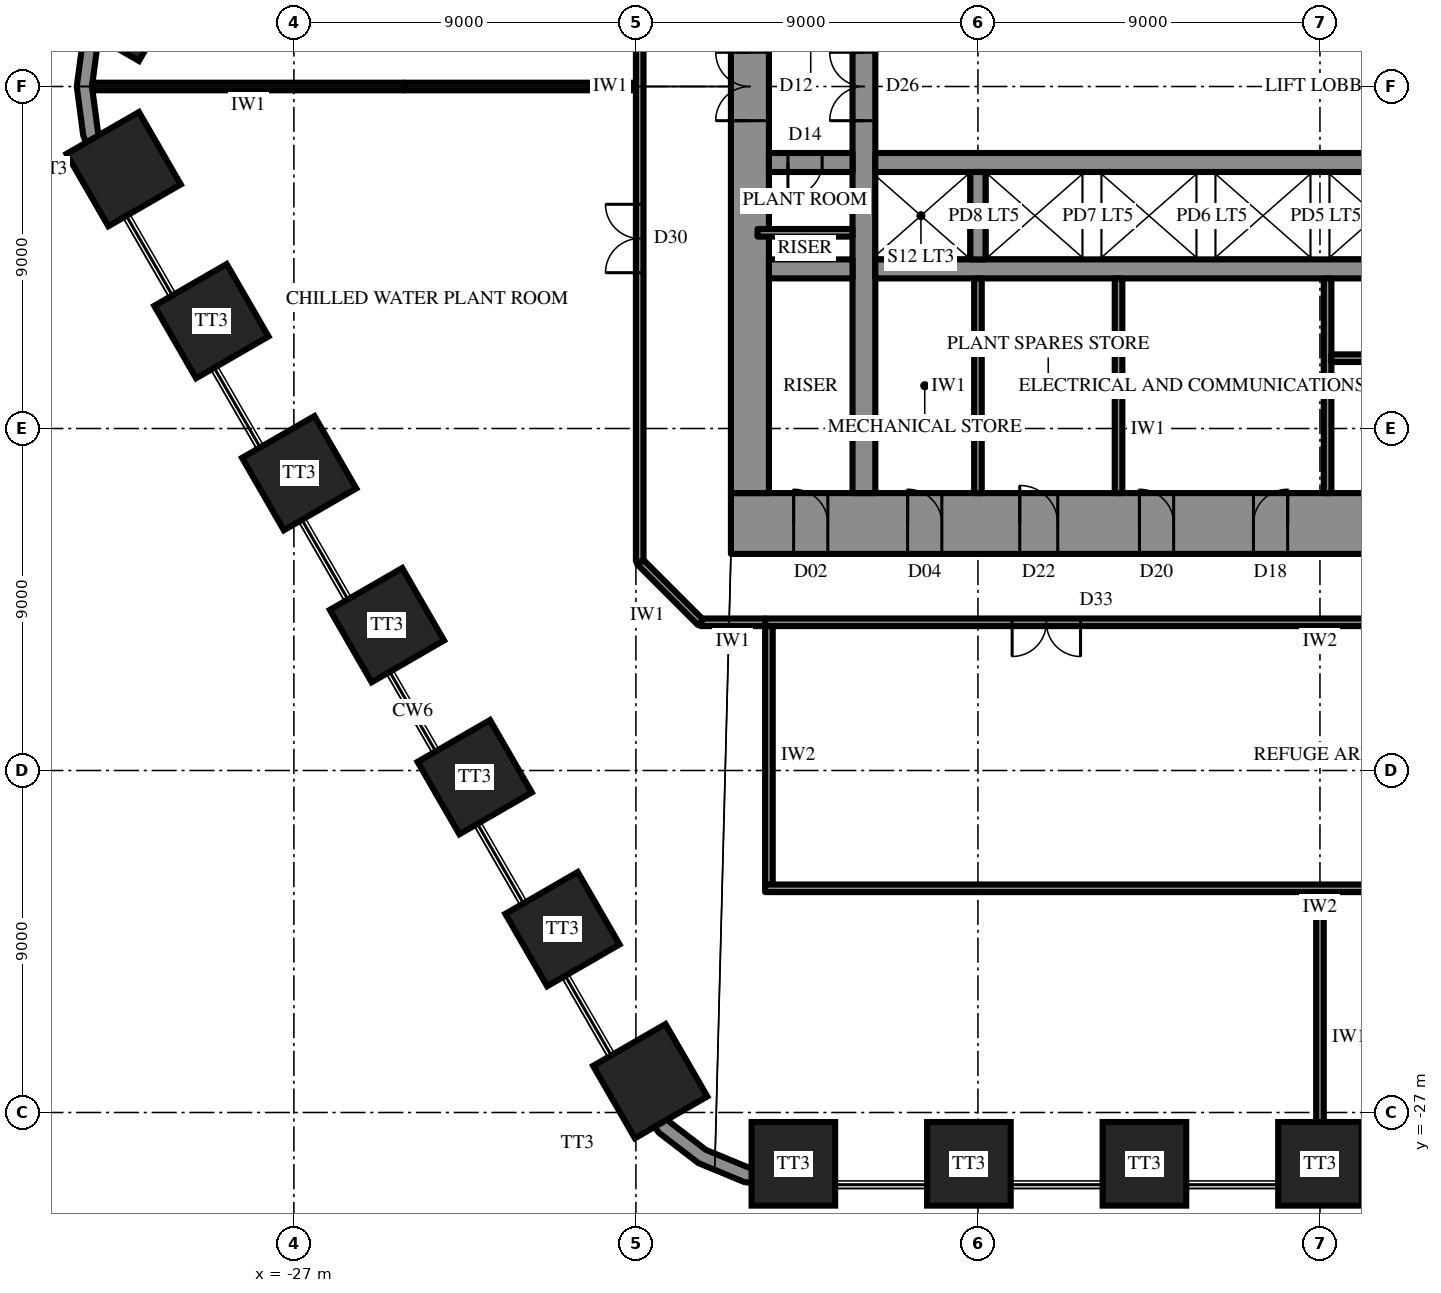
"""IFC4 building model, lengths in metres.
Left out: names, types, materials, properties, quantities, classifications, styles, units other than length and angle.
Written with IfcOpenShell. Run it as: python <this file> out.ifc"""

import sys

from ifc_helpers import new_model, si_unit, direction, frame, frame_2d, origin, origin_2d, place, context, subcontext, project, spatial, polyline, rectangle, outline, extrude, element, fill, save


model = new_model("IFC4")
c1 = context("Model", 3, precision=1e-05, world=origin(), true_north=direction((0.0, 1.0)))
c2 = subcontext(c1, "Body", "Model", "MODEL_VIEW")
j1 = project(units=[si_unit("LENGTHUNIT", "METRE"), si_unit("PLANEANGLEUNIT", "RADIAN")], contexts=[c1])
p1 = place(None, origin())
s1 = spatial("IfcSite", under=j1, at=p1, CompositionType="ELEMENT")
p2 = place(p1, origin())
s2 = spatial("IfcBuilding", under=s1, at=p2, CompositionType="ELEMENT")
p3 = place(p2, frame((0.0, 0.0, 299.5)))
s3 = spatial("IfcBuildingStorey", under=s2, at=p3, CompositionType="ELEMENT", Elevation=299.5)
for number, where, z_axis, x_axis in (
    (1, (-31.48, 2.175, 0.0), (0.0, 0.0, 1.0), (-0.5, -0.866, 0.0)),
    (2, (-31.48, -2.175, 0.0), (0.0, 0.0, 1.0), (0.5, -0.866, 0.0)),
    (3, (-29.171, -6.175, 0.0), (0.0, 0.0, 1.0), (0.5, -0.866, 0.0)),
    (4, (-26.861, -10.175, 0.0), (0.0, 0.0, 1.0), (0.5, -0.866, 0.0)),
    (5, (-24.552, -14.175, 0.0), (0.0, 0.0, 1.0), (0.5, -0.866, 0.0)),
    (6, (-22.242, -18.175, 0.0), (0.0, 0.0, 1.0), (0.5, -0.866, 0.0)),
    (7, (-19.933, -22.175, 0.0), (0.0, 0.0, 1.0), (0.5, -0.866, 0.0)),
    (8, (-17.624, -26.175, 0.0), (0.0, 0.0, 1.0), (0.5, -0.866, 0.0)),
    (9, (-13.856, -28.35, 0.0), (0.0, 0.0, 1.0), (1.0, 0.0, 0.0)),
    (10, (-9.238, -28.35, 0.0), (0.0, 0.0, 1.0), (1.0, 0.0, 0.0)),
    (11, (-4.619, -28.35, 0.0), (0.0, 0.0, 1.0), (1.0, 0.0, 0.0)),
    (12, (0.0, -28.35, 0.0), (0.0, 0.0, 1.0), (1.0, 0.0, 0.0)),
):
    element("IfcColumn", number, at=place(p3, frame(where, z_axis=z_axis, x_axis=x_axis)), inside=s3, PredefinedType="COLUMN", context=c2, shape_type="SweptSolid", body=[
        extrude(rectangle(XDim=2.2, YDim=2.2, at=origin_2d()), origin(), (0.0, 0.0, 1.0), 7.0),
    ])
p4 = place(p3, frame((15.5, -11.5, 0.0), z_axis=(0.0, 0.0, 1.0), x_axis=(-1.0, 0.0, 0.0)))
e13 = element("IfcWall", 13, at=p4, inside=s3, PredefinedType="SHEAR", context=c2, shape_type="SweptSolid", body=[
    extrude(rectangle(XDim=31.0, YDim=1.6, at=frame_2d((15.5, 0.0))), origin(), (0.0, 0.0, 1.0), 7.0),
])
p5 = place(p4, frame((16.35, 0.0, 0.0)))
e14 = element("IfcOpeningElement", 14, at=p5, cuts=e13, PredefinedType="OPENING", context=c2, shape_type="SweptSolid", body=[
    extrude(rectangle(XDim=0.9, YDim=2.2, at=frame_2d((0.45, 1.1))), frame((0.0, 0.81, 0.0), z_axis=(0.0, -1.0, 0.0), x_axis=(1.0, 0.0, 0.0)), (0.0, 0.0, 1.0), 1.62),
])
p6 = place(p4, frame((19.35, 0.0, 0.0)))
e15 = element("IfcOpeningElement", 15, at=p6, cuts=e13, PredefinedType="OPENING", context=c2, shape_type="SweptSolid", body=[
    extrude(rectangle(XDim=0.9, YDim=2.2, at=frame_2d((0.45, 1.1))), frame((0.0, 0.81, 0.0), z_axis=(0.0, -1.0, 0.0), x_axis=(1.0, 0.0, 0.0)), (0.0, 0.0, 1.0), 1.62),
])
p7 = place(p4, frame((22.4, 0.0, 0.0)))
e16 = element("IfcOpeningElement", 16, at=p7, cuts=e13, PredefinedType="OPENING", context=c2, shape_type="SweptSolid", body=[
    extrude(rectangle(XDim=1.0, YDim=2.2, at=frame_2d((0.5, 1.1))), frame((0.0, 0.81, 0.0), z_axis=(0.0, -1.0, 0.0), x_axis=(1.0, 0.0, 0.0)), (0.0, 0.0, 1.0), 1.62),
])
p8 = place(p4, frame((1.65, 0.0, 0.0)))
e17 = element("IfcOpeningElement", 17, at=p8, cuts=e13, PredefinedType="OPENING", context=c2, shape_type="SweptSolid", body=[
    extrude(rectangle(XDim=0.9, YDim=2.2, at=frame_2d((0.45, 1.1))), frame((0.0, 0.81, 0.0), z_axis=(0.0, -1.0, 0.0), x_axis=(1.0, 0.0, 0.0)), (0.0, 0.0, 1.0), 1.62),
])
p9 = place(p4, frame((4.65, 0.0, 0.0)))
e18 = element("IfcOpeningElement", 18, at=p9, cuts=e13, PredefinedType="OPENING", context=c2, shape_type="SweptSolid", body=[
    extrude(rectangle(XDim=0.9, YDim=2.2, at=frame_2d((0.45, 1.1))), frame((0.0, 0.81, 0.0), z_axis=(0.0, -1.0, 0.0), x_axis=(1.0, 0.0, 0.0)), (0.0, 0.0, 1.0), 1.62),
])
p10 = place(p4, frame((25.45, 0.0, 0.0)))
e19 = element("IfcOpeningElement", 19, at=p10, cuts=e13, PredefinedType="OPENING", context=c2, shape_type="SweptSolid", body=[
    extrude(rectangle(XDim=0.9, YDim=2.2, at=frame_2d((0.45, 1.1))), frame((0.0, 0.81, 0.0), z_axis=(0.0, -1.0, 0.0), x_axis=(1.0, 0.0, 0.0)), (0.0, 0.0, 1.0), 1.62),
])
p11 = place(p4, frame((28.45, 0.0, 0.0)))
e20 = element("IfcOpeningElement", 20, at=p11, cuts=e13, PredefinedType="OPENING", context=c2, shape_type="SweptSolid", body=[
    extrude(rectangle(XDim=0.9, YDim=2.2, at=frame_2d((0.45, 1.1))), frame((0.0, 0.81, 0.0), z_axis=(0.0, -1.0, 0.0), x_axis=(1.0, 0.0, 0.0)), (0.0, 0.0, 1.0), 1.62),
])
p12 = place(p3, frame((-15.0, 10.7, 0.0), z_axis=(0.0, 0.0, 1.0), x_axis=(0.0, -1.0, 0.0)))
e21 = element("IfcWall", 21, at=p12, inside=s3, PredefinedType="SHEAR", context=c2, shape_type="SweptSolid", body=[
    extrude(rectangle(XDim=21.4, YDim=1.0, at=frame_2d((10.7, 0.0))), origin(), (0.0, 0.0, 1.0), 7.0),
])
p13 = place(p12, frame((9.8, 0.0, 0.0)))
e22 = element("IfcOpeningElement", 22, at=p13, cuts=e21, PredefinedType="OPENING", context=c2, shape_type="SweptSolid", body=[
    extrude(rectangle(XDim=1.8, YDim=2.4, at=frame_2d((0.9, 1.2))), frame((0.0, 0.51, 0.0), z_axis=(0.0, -1.0, 0.0), x_axis=(1.0, 0.0, 0.0)), (0.0, 0.0, 1.0), 1.02),
])
p14 = place(p3, frame((-12.0, -10.7, 0.0), z_axis=(0.0, 0.0, 1.0), x_axis=(0.0, 1.0, 0.0)))
e23 = element("IfcWall", 23, at=p14, inside=s3, PredefinedType="SHEAR", context=c2, shape_type="SweptSolid", body=[
    extrude(rectangle(XDim=21.4, YDim=0.6, at=frame_2d((10.7, 0.0))), origin(), (0.0, 0.0, 1.0), 7.0),
])
p15 = place(p14, frame((9.8, 0.0, 0.0)))
e24 = element("IfcOpeningElement", 24, at=p15, cuts=e23, PredefinedType="OPENING", context=c2, shape_type="SweptSolid", body=[
    extrude(rectangle(XDim=1.8, YDim=2.4, at=frame_2d((0.9, 1.2))), frame((0.0, 0.31, 0.0), z_axis=(0.0, -1.0, 0.0), x_axis=(1.0, 0.0, 0.0)), (0.0, 0.0, 1.0), 0.62),
])
p16 = place(p3, frame((3.2, -2.0, 0.0), z_axis=(0.0, 0.0, 1.0), x_axis=(-1.0, 0.0, 0.0)))
e25 = element("IfcWall", 25, at=p16, inside=s3, PredefinedType="SHEAR", context=c2, shape_type="SweptSolid", body=[
    extrude(rectangle(XDim=14.9, YDim=0.5, at=frame_2d((7.45, 0.0))), origin(), (0.0, 0.0, 1.0), 7.0),
])
p17 = place(p3, frame((-12.3, -2.0, 0.0), z_axis=(0.0, 0.0, 1.0), x_axis=(-1.0, 0.0, 0.0)))
e26 = element("IfcWall", 26, at=p17, inside=s3, PredefinedType="SHEAR", context=c2, shape_type="SweptSolid", body=[
    extrude(rectangle(XDim=2.2, YDim=0.5, at=frame_2d((1.1, 0.0))), origin(), (0.0, 0.0, 1.0), 7.0),
])
p18 = place(p17, frame((0.8, 0.0, 0.0)))
e27 = element("IfcOpeningElement", 27, at=p18, cuts=e26, PredefinedType="OPENING", context=c2, shape_type="SweptSolid", body=[
    extrude(rectangle(XDim=0.9, YDim=2.2, at=frame_2d((0.45, 1.1))), frame((0.0, 0.26, 0.0), z_axis=(0.0, -1.0, 0.0), x_axis=(1.0, 0.0, 0.0)), (0.0, 0.0, 1.0), 0.52),
])
p19 = place(p3, frame((11.7, -4.8, 0.0), z_axis=(0.0, 0.0, 1.0), x_axis=(-1.0, 0.0, 0.0)))
e28 = element("IfcWall", 28, at=p19, inside=s3, PredefinedType="SHEAR", context=c2, shape_type="SweptSolid", body=[
    extrude(rectangle(XDim=23.4, YDim=0.5, at=frame_2d((11.7, 0.0))), origin(), (0.0, 0.0, 1.0), 7.0),
])
p20 = place(p19, frame((6.6, 0.0, 0.0)))
e29 = element("IfcOpeningElement", 29, at=p20, cuts=e28, PredefinedType="OPENING", context=c2, shape_type="SweptSolid", body=[
    extrude(rectangle(XDim=1.2, YDim=2.2, at=frame_2d((0.6, 1.1))), frame((0.0, 0.26, 0.0), z_axis=(0.0, -1.0, 0.0), x_axis=(1.0, 0.0, 0.0)), (0.0, 0.0, 1.0), 0.52),
])
p21 = place(p19, frame((3.6, 0.0, 0.0)))
e30 = element("IfcOpeningElement", 30, at=p21, cuts=e28, PredefinedType="OPENING", context=c2, shape_type="SweptSolid", body=[
    extrude(rectangle(XDim=1.2, YDim=2.2, at=frame_2d((0.6, 1.1))), frame((0.0, 0.26, 0.0), z_axis=(0.0, -1.0, 0.0), x_axis=(1.0, 0.0, 0.0)), (0.0, 0.0, 1.0), 0.52),
])
p22 = place(p3, frame((-12.3, -4.8, 0.0), z_axis=(0.0, 0.0, 1.0), x_axis=(-1.0, 0.0, 0.0)))
e31 = element("IfcWall", 31, at=p22, inside=s3, PredefinedType="SHEAR", context=c2, shape_type="SweptSolid", body=[
    extrude(rectangle(XDim=2.2, YDim=0.5, at=frame_2d((1.1, 0.0))), origin(), (0.0, 0.0, 1.0), 7.0),
])
p23 = place(p3, frame((-9.0, -2.25, 0.0), z_axis=(0.0, 0.0, 1.0), x_axis=(0.0, -1.0, 0.0)))
e32 = element("IfcWall", 32, at=p23, inside=s3, PredefinedType="SHEAR", context=c2, shape_type="SweptSolid", body=[
    extrude(rectangle(XDim=2.3, YDim=0.4, at=frame_2d((1.15, 0.0))), origin(), (0.0, 0.0, 1.0), 7.0),
])
p24 = place(p3, frame((0.2, -5.05, 0.0), z_axis=(0.0, 0.0, 1.0), x_axis=(0.0, -1.0, 0.0)))
e33 = element("IfcWall", 33, at=p24, inside=s3, PredefinedType="SHEAR", context=c2, shape_type="SweptSolid", body=[
    extrude(rectangle(XDim=5.65, YDim=0.2, at=frame_2d((2.825, 0.0))), origin(), (0.0, 0.0, 1.0), 7.0),
])
p25 = place(p3, frame((8.9, -7.15, 0.0), z_axis=(0.0, 0.0, 1.0), x_axis=(-1.0, 0.0, 0.0)))
e34 = element("IfcWall", 34, at=p25, inside=s3, PredefinedType="SHEAR", context=c2, shape_type="SweptSolid", body=[
    extrude(rectangle(XDim=8.6, YDim=0.2, at=frame_2d((4.3, 0.0))), origin(), (0.0, 0.0, 1.0), 7.0),
])
p26 = place(p25, frame((0.3, 0.0, 0.0)))
e35 = element("IfcOpeningElement", 35, at=p26, cuts=e34, PredefinedType="OPENING", context=c2, shape_type="SweptSolid", body=[
    extrude(rectangle(XDim=1.0, YDim=2.2, at=frame_2d((0.5, 1.1))), frame((0.0, 0.11, 0.0), z_axis=(0.0, -1.0, 0.0), x_axis=(1.0, 0.0, 0.0)), (0.0, 0.0, 1.0), 0.22),
])
p27 = place(p3, origin())
e36 = element("IfcWall", 36, at=p27, inside=s3, PredefinedType="SOLIDWALL", context=c2, shape_type="SweptSolid", body=[
    extrude(outline(polyline([(-32.043, 2.5), (-32.542, 1.294), (-32.713, 0.0), (-32.542, -1.294), (-32.043, -2.5), (-31.697, -2.3), (-32.156, -1.191), (-32.313, 0.0), (-32.156, 1.191), (-31.697, 2.3), (-32.043, 2.5)])), origin(), (0.0, 0.0, 1.0), 4.7),
])
p28 = place(p3, origin())
e37 = element("IfcWall", 37, at=p28, inside=s3, PredefinedType="SOLIDWALL", context=c2, shape_type="SweptSolid", body=[
    extrude(outline(polyline([(-18.187, -26.5), (-17.392, -27.536), (-16.356, -28.33), (-15.15, -28.83), (-13.856, -29.0), (-13.856, -28.6), (-15.047, -28.443), (-16.156, -27.984), (-17.109, -27.253), (-17.84, -26.3), (-18.187, -26.5)])), origin(), (0.0, 0.0, 1.0), 4.7),
])
for number, where, z_axis, x_axis in (
    (38, (-9.0, -5.05, 0.0), (0.0, 0.0, 1.0), (0.0, -1.0, 0.0)),
    (39, (-5.3, -5.05, 0.0), (0.0, 0.0, 1.0), (0.0, -1.0, 0.0)),
):
    element("IfcWall", number, at=place(p3, frame(where, z_axis=z_axis, x_axis=x_axis)), inside=s3, PredefinedType="PARTITIONING", context=c2, shape_type="SweptSolid", body=[
        extrude(rectangle(XDim=5.65, YDim=0.2, at=frame_2d((2.825, 0.0))), origin(), (0.0, 0.0, 1.0), 6.7),
    ])
p29 = place(p3, frame((-12.3, -3.85, 0.0), z_axis=(0.0, 0.0, 1.0), x_axis=(-1.0, 0.0, 0.0)))
e40 = element("IfcWall", 40, at=p29, inside=s3, PredefinedType="PARTITIONING", context=c2, shape_type="SweptSolid", body=[
    extrude(rectangle(XDim=2.5, YDim=0.2, at=frame_2d((1.25, 0.0))), origin(), (0.0, 0.0, 1.0), 6.7),
])
p30 = place(p3, frame((14.6, -14.1, 0.0), z_axis=(0.0, 0.0, 1.0), x_axis=(-1.0, 0.0, 0.0)))
e41 = element("IfcWall", 41, at=p30, inside=s3, PredefinedType="PARTITIONING", context=c2, shape_type="SweptSolid", body=[
    extrude(rectangle(XDim=29.2, YDim=0.2, at=frame_2d((14.6, 0.0))), origin(), (0.0, 0.0, 1.0), 6.7),
])
p31 = place(p30, frame((20.9, 0.0, 0.0)))
e42 = element("IfcOpeningElement", 42, at=p31, cuts=e41, PredefinedType="OPENING", context=c2, shape_type="SweptSolid", body=[
    extrude(rectangle(XDim=1.8, YDim=2.4, at=frame_2d((0.9, 1.2))), frame((0.0, 0.11, 0.0), z_axis=(0.0, -1.0, 0.0), x_axis=(1.0, 0.0, 0.0)), (0.0, 0.0, 1.0), 0.22),
])
p32 = place(p30, frame((6.5, 0.0, 0.0)))
e43 = element("IfcOpeningElement", 43, at=p32, cuts=e41, PredefinedType="OPENING", context=c2, shape_type="SweptSolid", body=[
    extrude(rectangle(XDim=1.8, YDim=2.4, at=frame_2d((0.9, 1.2))), frame((0.0, 0.11, 0.0), z_axis=(0.0, -1.0, 0.0), x_axis=(1.0, 0.0, 0.0)), (0.0, 0.0, 1.0), 0.22),
])
p33 = place(p3, frame((-14.5, -14.2, 0.0), z_axis=(0.0, 0.0, 1.0), x_axis=(0.0, -1.0, 0.0)))
e44 = element("IfcWall", 44, at=p33, inside=s3, PredefinedType="PARTITIONING", context=c2, shape_type="SweptSolid", body=[
    extrude(rectangle(XDim=6.8, YDim=0.2, at=frame_2d((3.4, 0.0))), origin(), (0.0, 0.0, 1.0), 6.7),
])
p34 = place(p3, frame((14.6, -21.1, 0.0), z_axis=(0.0, 0.0, 1.0), x_axis=(-1.0, 0.0, 0.0)))
e45 = element("IfcWall", 45, at=p34, inside=s3, PredefinedType="PARTITIONING", context=c2, shape_type="SweptSolid", body=[
    extrude(rectangle(XDim=29.2, YDim=0.2, at=frame_2d((14.6, 0.0))), origin(), (0.0, 0.0, 1.0), 6.7),
])
p35 = place(p3, frame((-14.6, -14.1, 0.0), z_axis=(0.0, 0.0, 1.0), x_axis=(-1.0, 0.0, 0.0)))
e46 = element("IfcWall", 46, at=p35, inside=s3, PredefinedType="PARTITIONING", context=c2, shape_type="SweptSolid", body=[
    extrude(rectangle(XDim=1.7, YDim=0.2, at=frame_2d((0.85, 0.0))), origin(), (0.0, 0.0, 1.0), 6.7),
])
p36 = place(p3, frame((-16.3, -14.1, 0.0), z_axis=(0.0, 0.0, 1.0), x_axis=(-0.707052830339, 0.707160727918, 0.0)))
e47 = element("IfcWall", 47, at=p36, inside=s3, PredefinedType="PARTITIONING", context=c2, shape_type="SweptSolid", body=[
    extrude(rectangle(XDim=2.263, YDim=0.2, at=frame_2d((1.131, 0.0))), origin(), (0.0, 0.0, 1.0), 6.7),
])
p37 = place(p3, frame((-17.9, -12.5, 0.0), z_axis=(0.0, 0.0, 1.0), x_axis=(0.0, 1.0, 0.0)))
e48 = element("IfcWall", 48, at=p37, inside=s3, PredefinedType="PARTITIONING", context=c2, shape_type="SweptSolid", body=[
    extrude(rectangle(XDim=25.0, YDim=0.2, at=frame_2d((12.5, 0.0))), origin(), (0.0, 0.0, 1.0), 6.7),
])
p38 = place(p37, frame((15.6, 0.0, 0.0)))
e49 = element("IfcOpeningElement", 49, at=p38, cuts=e48, PredefinedType="OPENING", context=c2, shape_type="SweptSolid", body=[
    extrude(rectangle(XDim=1.8, YDim=2.4, at=frame_2d((0.9, 1.2))), frame((0.0, 0.11, 0.0), z_axis=(0.0, -1.0, 0.0), x_axis=(1.0, 0.0, 0.0)), (0.0, 0.0, 1.0), 0.22),
])
p39 = place(p37, frame((7.6, 0.0, 0.0)))
e50 = element("IfcOpeningElement", 50, at=p39, cuts=e48, PredefinedType="OPENING", context=c2, shape_type="SweptSolid", body=[
    extrude(rectangle(XDim=1.8, YDim=2.4, at=frame_2d((0.9, 1.2))), frame((0.0, 0.11, 0.0), z_axis=(0.0, -1.0, 0.0), x_axis=(1.0, 0.0, 0.0)), (0.0, 0.0, 1.0), 0.22),
])
p40 = place(p3, frame((0.0, -21.2, 0.0), z_axis=(0.0, 0.0, 1.0), x_axis=(0.0, -1.0, 0.0)))
e51 = element("IfcWall", 51, at=p40, inside=s3, PredefinedType="PARTITIONING", context=c2, shape_type="SweptSolid", body=[
    extrude(rectangle(XDim=7.61, YDim=0.2, at=frame_2d((3.805, 0.0))), origin(), (0.0, 0.0, 1.0), 2.7),
])
p41 = place(p3, frame((-18.0, 0.0, 0.0), z_axis=(0.0, 0.0, 1.0), x_axis=(-1.0, 0.0, 0.0)))
e52 = element("IfcWall", 52, at=p41, inside=s3, PredefinedType="PARTITIONING", context=c2, shape_type="SweptSolid", body=[
    extrude(rectangle(XDim=6.096, YDim=0.2, at=frame_2d((3.048, 0.0))), origin(), (0.0, 0.0, 1.0), 2.7),
])
p42 = place(p3, frame((-24.096, 0.0, 0.0), z_axis=(0.0, 0.0, 1.0), x_axis=(-1.0, 0.0, 0.0)))
e53 = element("IfcWall", 53, at=p42, inside=s3, PredefinedType="PARTITIONING", context=c2, shape_type="SweptSolid", body=[
    extrude(rectangle(XDim=8.204, YDim=0.2, at=frame_2d((4.102, 0.0))), origin(), (0.0, 0.0, 1.0), 6.7),
])
p43 = place(p13, frame((1.8, 0.0, 0.0), z_axis=(0.0, 0.0, 1.0), x_axis=(-1.0, 0.0, 0.0)))
e54 = element("IfcDoor", 54, at=p43, inside=s3, OperationType="DOUBLE_DOOR_SINGLE_SWING", PredefinedType="DOOR", context=c2, shape_type="SweptSolid", body=[
    extrude(rectangle(XDim=1.8, YDim=2.4, at=frame_2d((0.9, 1.2))), frame((0.0, 0.025, 0.0), z_axis=(0.0, -1.0, 0.0), x_axis=(1.0, 0.0, 0.0)), (0.0, 0.0, 1.0), 0.05),
])
fill(e22, e54)
p44 = place(p5, frame((0.9, 0.0, 0.0), z_axis=(0.0, 0.0, 1.0), x_axis=(-1.0, 0.0, 0.0)))
e55 = element("IfcDoor", 55, at=p44, inside=s3, OperationType="SINGLE_SWING_LEFT", PredefinedType="DOOR", context=c2, shape_type="SweptSolid", body=[
    extrude(rectangle(XDim=0.9, YDim=2.2, at=frame_2d((0.45, 1.1))), frame((0.0, 0.025, 0.0), z_axis=(0.0, -1.0, 0.0), x_axis=(1.0, 0.0, 0.0)), (0.0, 0.0, 1.0), 0.05),
])
fill(e14, e55)
p45 = place(p6, frame((0.9, 0.0, 0.0), z_axis=(0.0, 0.0, 1.0), x_axis=(-1.0, 0.0, 0.0)))
e56 = element("IfcDoor", 56, at=p45, inside=s3, OperationType="SINGLE_SWING_RIGHT", PredefinedType="DOOR", context=c2, shape_type="SweptSolid", body=[
    extrude(rectangle(XDim=0.9, YDim=2.2, at=frame_2d((0.45, 1.1))), frame((0.0, 0.025, 0.0), z_axis=(0.0, -1.0, 0.0), x_axis=(1.0, 0.0, 0.0)), (0.0, 0.0, 1.0), 0.05),
])
fill(e15, e56)
p46 = place(p7, frame((1.0, 0.0, 0.0), z_axis=(0.0, 0.0, 1.0), x_axis=(-1.0, 0.0, 0.0)))
e57 = element("IfcDoor", 57, at=p46, inside=s3, OperationType="SINGLE_SWING_RIGHT", PredefinedType="DOOR", context=c2, shape_type="SweptSolid", body=[
    extrude(rectangle(XDim=1.0, YDim=2.2, at=frame_2d((0.5, 1.1))), frame((0.0, 0.025, 0.0), z_axis=(0.0, -1.0, 0.0), x_axis=(1.0, 0.0, 0.0)), (0.0, 0.0, 1.0), 0.05),
])
fill(e16, e57)
p47 = place(p10, frame((0.9, 0.0, 0.0), z_axis=(0.0, 0.0, 1.0), x_axis=(-1.0, 0.0, 0.0)))
e58 = element("IfcDoor", 58, at=p47, inside=s3, OperationType="SINGLE_SWING_RIGHT", PredefinedType="DOOR", context=c2, shape_type="SweptSolid", body=[
    extrude(rectangle(XDim=0.9, YDim=2.2, at=frame_2d((0.45, 1.1))), frame((0.0, 0.025, 0.0), z_axis=(0.0, -1.0, 0.0), x_axis=(1.0, 0.0, 0.0)), (0.0, 0.0, 1.0), 0.05),
])
fill(e19, e58)
p48 = place(p11, frame((0.9, 0.0, 0.0), z_axis=(0.0, 0.0, 1.0), x_axis=(-1.0, 0.0, 0.0)))
e59 = element("IfcDoor", 59, at=p48, inside=s3, OperationType="SINGLE_SWING_RIGHT", PredefinedType="DOOR", context=c2, shape_type="SweptSolid", body=[
    extrude(rectangle(XDim=0.9, YDim=2.2, at=frame_2d((0.45, 1.1))), frame((0.0, 0.025, 0.0), z_axis=(0.0, -1.0, 0.0), x_axis=(1.0, 0.0, 0.0)), (0.0, 0.0, 1.0), 0.05),
])
fill(e20, e59)
p49 = place(p18, origin())
e60 = element("IfcDoor", 60, at=p49, inside=s3, OperationType="SINGLE_SWING_LEFT", PredefinedType="DOOR", context=c2, shape_type="SweptSolid", body=[
    extrude(rectangle(XDim=0.9, YDim=2.2, at=frame_2d((0.45, 1.1))), frame((0.0, 0.025, 0.0), z_axis=(0.0, -1.0, 0.0), x_axis=(1.0, 0.0, 0.0)), (0.0, 0.0, 1.0), 0.05),
])
fill(e27, e60)
p50 = place(p15, origin())
e61 = element("IfcDoor", 61, at=p50, inside=s3, OperationType="DOUBLE_DOOR_SINGLE_SWING", PredefinedType="DOOR", context=c2, shape_type="SweptSolid", body=[
    extrude(rectangle(XDim=1.8, YDim=2.4, at=frame_2d((0.9, 1.2))), frame((0.0, 0.025, 0.0), z_axis=(0.0, -1.0, 0.0), x_axis=(1.0, 0.0, 0.0)), (0.0, 0.0, 1.0), 0.05),
])
fill(e24, e61)
p51 = place(p31, origin())
e62 = element("IfcDoor", 62, at=p51, inside=s3, OperationType="DOUBLE_DOOR_SINGLE_SWING", PredefinedType="DOOR", context=c2, shape_type="SweptSolid", body=[
    extrude(rectangle(XDim=1.8, YDim=2.4, at=frame_2d((0.9, 1.2))), frame((0.0, 0.025, 0.0), z_axis=(0.0, -1.0, 0.0), x_axis=(1.0, 0.0, 0.0)), (0.0, 0.0, 1.0), 0.05),
])
fill(e42, e62)
p52 = place(p39, origin())
e63 = element("IfcDoor", 63, at=p52, inside=s3, OperationType="DOUBLE_DOOR_SINGLE_SWING", PredefinedType="DOOR", context=c2, shape_type="SweptSolid", body=[
    extrude(rectangle(XDim=1.8, YDim=2.4, at=frame_2d((0.9, 1.2))), frame((0.0, 0.025, 0.0), z_axis=(0.0, -1.0, 0.0), x_axis=(1.0, 0.0, 0.0)), (0.0, 0.0, 1.0), 0.05),
])
fill(e50, e63)
save(model, sys.argv[1])
